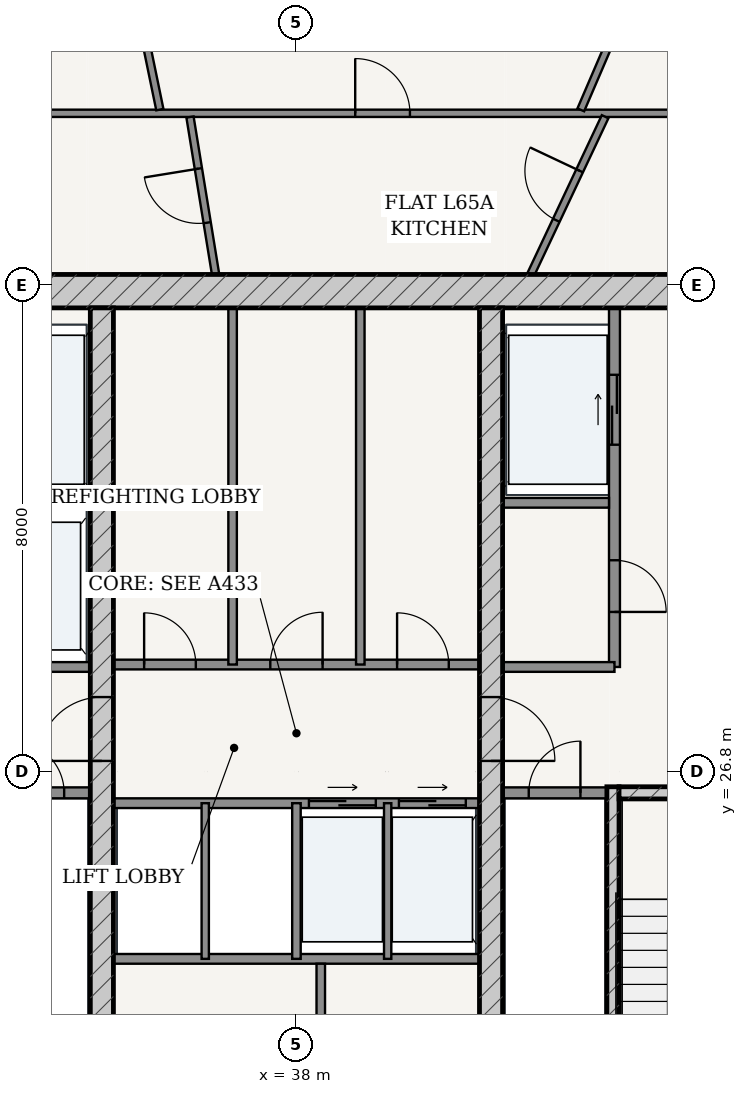
"""IFC4 building model, lengths in metres.
Left out: names, types, materials, properties, quantities, classifications, styles, units other than length and angle.
Written with IfcOpenShell. Run it as: python <this file> out.ifc"""

import sys

from ifc_helpers import new_model, si_unit, direction, frame, frame_2d, origin, place, context, subcontext, project, spatial, rectangle, extrude, source, transform, mapped, element, fill, save


model = new_model("IFC4")
c1 = context("Model", 3, precision=1e-05, world=origin(), true_north=direction((-0.2419218956, 0.970295726276)))
c2 = subcontext(c1, "Body", "Model", "MODEL_VIEW")
j1 = project(units=[si_unit("LENGTHUNIT", "METRE"), si_unit("PLANEANGLEUNIT", "RADIAN")], contexts=[c1])
p1 = place(None, origin())
s1 = spatial("IfcSite", under=j1, at=p1, CompositionType="ELEMENT")
p2 = place(p1, origin())
s2 = spatial("IfcBuilding", under=s1, at=p2, CompositionType="ELEMENT")
p3 = place(p2, frame((0.0, 0.0, 248.2)))
s3 = spatial("IfcBuildingStorey", under=s2, at=p3, CompositionType="ELEMENT", Elevation=248.2)
p4 = place(p3, frame((28.825, 34.7, 0.0), z_axis=(0.0, 0.0, 1.0), x_axis=(1.0, 0.0, 0.0)))
e1 = element("IfcWall", 1, at=p4, inside=s3, PredefinedType="SHEAR", context=c2, shape_type="SweptSolid", body=[
    extrude(rectangle(XDim=18.35, YDim=0.55, at=frame_2d((9.175, 0.0))), origin(), (0.0, 0.0, 1.0), 3.49),
])
p5 = place(p3, frame((43.205, 19.175, 0.0), z_axis=(0.0, 0.0, 1.0), x_axis=(0.0, 1.0, 0.0)))
e2 = element("IfcWall", 2, at=p5, inside=s3, PredefinedType="SOLIDWALL", context=c2, shape_type="SweptSolid", body=[
    extrude(rectangle(XDim=7.375, YDim=0.2, at=frame_2d((3.688, 0.0))), origin(), (0.0, 0.0, 1.0), 3.49),
])
p6 = place(p3, frame((43.305, 26.45, 0.0), z_axis=(0.0, 0.0, 1.0), x_axis=(1.0, 0.0, 0.0)))
e3 = element("IfcWall", 3, at=p6, inside=s3, PredefinedType="SOLIDWALL", context=c2, shape_type="SweptSolid", body=[
    extrude(rectangle(XDim=3.32, YDim=0.2, at=frame_2d((1.66, 0.0))), origin(), (0.0, 0.0, 1.0), 3.49),
])
p7 = place(p6, frame((1.185, 0.0, 0.0)))
e4 = element("IfcOpeningElement", 4, at=p7, cuts=e3, PredefinedType="OPENING", context=c2, shape_type="SweptSolid", body=[
    extrude(rectangle(XDim=0.95, YDim=2.15, at=frame_2d((0.475, 1.075))), frame((0.0, 0.11, 0.0), z_axis=(0.0, -1.0, 0.0), x_axis=(1.0, 0.0, 0.0)), (0.0, 0.0, 1.0), 0.22),
])
p8 = place(p3, frame((34.8, 19.175, 0.0), z_axis=(0.0, 0.0, 1.0), x_axis=(0.0, 1.0, 0.0)))
e5 = element("IfcWall", 5, at=p8, inside=s3, PredefinedType="SHEAR", context=c2, shape_type="SweptSolid", body=[
    extrude(rectangle(XDim=15.25, YDim=0.38, at=frame_2d((7.625, 0.0))), origin(), (0.0, 0.0, 1.0), 3.49),
])
p9 = place(p8, frame((7.8, 0.0, 0.0)))
e6 = element("IfcOpeningElement", 6, at=p9, cuts=e5, PredefinedType="OPENING", context=c2, shape_type="SweptSolid", body=[
    extrude(rectangle(XDim=1.05, YDim=2.15, at=frame_2d((0.525, 1.075))), frame((0.0, 0.2, 0.0), z_axis=(0.0, -1.0, 0.0), x_axis=(1.0, 0.0, 0.0)), (0.0, 0.0, 1.0), 0.4),
])
p10 = place(p3, frame((41.2, 19.175, 0.0), z_axis=(0.0, 0.0, 1.0), x_axis=(0.0, 1.0, 0.0)))
e7 = element("IfcWall", 7, at=p10, inside=s3, PredefinedType="SHEAR", context=c2, shape_type="SweptSolid", body=[
    extrude(rectangle(XDim=15.25, YDim=0.38, at=frame_2d((7.625, 0.0))), origin(), (0.0, 0.0, 1.0), 3.49),
])
p11 = place(p10, frame((7.8, 0.0, 0.0)))
e8 = element("IfcOpeningElement", 8, at=p11, cuts=e7, PredefinedType="OPENING", context=c2, shape_type="SweptSolid", body=[
    extrude(rectangle(XDim=1.05, YDim=2.15, at=frame_2d((0.525, 1.075))), frame((0.0, 0.2, 0.0), z_axis=(0.0, -1.0, 0.0), x_axis=(1.0, 0.0, 0.0)), (0.0, 0.0, 1.0), 0.4),
])
p12 = place(p3, frame((32.9, 26.45, 0.0), z_axis=(0.0, 0.0, 1.0), x_axis=(1.0, 0.0, 0.0)))
e9 = element("IfcWall", 9, at=p12, inside=s3, PredefinedType="PARTITIONING", context=c2, shape_type="SweptSolid", body=[
    extrude(rectangle(XDim=1.71, YDim=0.18, at=frame_2d((0.855, 0.0))), origin(), (0.0, 0.0, 1.0), 3.49),
])
p13 = place(p12, frame((0.43, 0.0, 0.0)))
e10 = element("IfcOpeningElement", 10, at=p13, cuts=e9, PredefinedType="OPENING", context=c2, shape_type="SweptSolid", body=[
    extrude(rectangle(XDim=0.85, YDim=2.1, at=frame_2d((0.425, 1.05))), frame((0.0, 0.1, 0.0), z_axis=(0.0, -1.0, 0.0), x_axis=(1.0, 0.0, 0.0)), (0.0, 0.0, 1.0), 0.2),
])
p14 = place(p3, frame((41.39, 26.45, 0.0), z_axis=(0.0, 0.0, 1.0), x_axis=(1.0, 0.0, 0.0)))
e11 = element("IfcWall", 11, at=p14, inside=s3, PredefinedType="PARTITIONING", context=c2, shape_type="SweptSolid", body=[
    extrude(rectangle(XDim=1.71, YDim=0.18, at=frame_2d((0.855, 0.0))), origin(), (0.0, 0.0, 1.0), 3.49),
])
p15 = place(p14, frame((0.43, 0.0, 0.0)))
e12 = element("IfcOpeningElement", 12, at=p15, cuts=e11, PredefinedType="OPENING", context=c2, shape_type="SweptSolid", body=[
    extrude(rectangle(XDim=0.85, YDim=2.1, at=frame_2d((0.425, 1.05))), frame((0.0, 0.1, 0.0), z_axis=(0.0, -1.0, 0.0), x_axis=(1.0, 0.0, 0.0)), (0.0, 0.0, 1.0), 0.2),
])
p16 = place(p3, frame((32.86, 31.22, 0.0), z_axis=(0.0, 0.0, 1.0), x_axis=(1.0, 0.0, 0.0)))
e13 = element("IfcWall", 13, at=p16, inside=s3, PredefinedType="PARTITIONING", context=c2, shape_type="SweptSolid", body=[
    extrude(rectangle(XDim=1.75, YDim=0.16, at=frame_2d((0.875, 0.0))), origin(), (0.0, 0.0, 1.0), 3.49),
])
p17 = place(p3, frame((32.77, 28.52, 0.0), z_axis=(0.0, 0.0, 1.0), x_axis=(1.0, 0.0, 0.0)))
e14 = element("IfcWall", 14, at=p17, inside=s3, PredefinedType="PARTITIONING", context=c2, shape_type="SweptSolid", body=[
    extrude(rectangle(XDim=1.84, YDim=0.16, at=frame_2d((0.92, 0.0))), origin(), (0.0, 0.0, 1.0), 3.49),
])
p18 = place(p3, frame((43.23, 28.52, 0.0), z_axis=(0.0, 0.0, 1.0), x_axis=(0.0, 1.0, 0.0)))
e15 = element("IfcWall", 15, at=p18, inside=s3, PredefinedType="PARTITIONING", context=c2, shape_type="SweptSolid", body=[
    extrude(rectangle(XDim=5.905, YDim=0.18, at=frame_2d((2.953, 0.0))), origin(), (0.0, 0.0, 1.0), 3.49),
])
p19 = place(p18, frame((0.905, 0.0, 0.0)))
e16 = element("IfcOpeningElement", 16, at=p19, cuts=e15, PredefinedType="OPENING", context=c2, shape_type="SweptSolid", body=[
    extrude(rectangle(XDim=0.85, YDim=2.1, at=frame_2d((0.425, 1.05))), frame((0.0, 0.1, 0.0), z_axis=(0.0, -1.0, 0.0), x_axis=(1.0, 0.0, 0.0)), (0.0, 0.0, 1.0), 0.2),
])
p20 = place(p18, frame((3.655, 0.0, 0.0)))
e17 = element("IfcOpeningElement", 17, at=p20, cuts=e15, PredefinedType="OPENING", context=c2, shape_type="SweptSolid", body=[
    extrude(rectangle(XDim=1.15, YDim=2.2, at=frame_2d((0.575, 1.1))), frame((0.0, 0.1, 0.0), z_axis=(0.0, -1.0, 0.0), x_axis=(1.0, 0.0, 0.0)), (0.0, 0.0, 1.0), 0.2),
])
p21 = place(p3, frame((41.39, 31.22, 0.0), z_axis=(0.0, 0.0, 1.0), x_axis=(1.0, 0.0, 0.0)))
e18 = element("IfcWall", 18, at=p21, inside=s3, PredefinedType="PARTITIONING", context=c2, shape_type="SweptSolid", body=[
    extrude(rectangle(XDim=1.75, YDim=0.16, at=frame_2d((0.875, 0.0))), origin(), (0.0, 0.0, 1.0), 3.49),
])
p22 = place(p3, frame((41.39, 28.52, 0.0), z_axis=(0.0, 0.0, 1.0), x_axis=(1.0, 0.0, 0.0)))
e19 = element("IfcWall", 19, at=p22, inside=s3, PredefinedType="PARTITIONING", context=c2, shape_type="SweptSolid", body=[
    extrude(rectangle(XDim=1.84, YDim=0.16, at=frame_2d((0.92, 0.0))), origin(), (0.0, 0.0, 1.0), 3.49),
])
p23 = place(p3, frame((34.99, 28.56, 0.0), z_axis=(0.0, 0.0, 1.0), x_axis=(1.0, 0.0, 0.0)))
e20 = element("IfcWall", 20, at=p23, inside=s3, PredefinedType="PARTITIONING", context=c2, shape_type="SweptSolid", body=[
    extrude(rectangle(XDim=6.02, YDim=0.16, at=frame_2d((3.01, 0.0))), origin(), (0.0, 0.0, 1.0), 3.49),
])
p24 = place(p23, frame((0.505, 0.0, 0.0)))
e21 = element("IfcOpeningElement", 21, at=p24, cuts=e20, PredefinedType="OPENING", context=c2, shape_type="SweptSolid", body=[
    extrude(rectangle(XDim=0.85, YDim=2.1, at=frame_2d((0.425, 1.05))), frame((0.0, 0.09, 0.0), z_axis=(0.0, -1.0, 0.0), x_axis=(1.0, 0.0, 0.0)), (0.0, 0.0, 1.0), 0.18),
])
p25 = place(p23, frame((2.58, 0.0, 0.0)))
e22 = element("IfcOpeningElement", 22, at=p25, cuts=e20, PredefinedType="OPENING", context=c2, shape_type="SweptSolid", body=[
    extrude(rectangle(XDim=0.86, YDim=2.1, at=frame_2d((0.43, 1.05))), frame((0.0, 0.09, 0.0), z_axis=(0.0, -1.0, 0.0), x_axis=(1.0, 0.0, 0.0)), (0.0, 0.0, 1.0), 0.18),
])
p26 = place(p23, frame((4.665, 0.0, 0.0)))
e23 = element("IfcOpeningElement", 23, at=p26, cuts=e20, PredefinedType="OPENING", context=c2, shape_type="SweptSolid", body=[
    extrude(rectangle(XDim=0.85, YDim=2.1, at=frame_2d((0.425, 1.05))), frame((0.0, 0.09, 0.0), z_axis=(0.0, -1.0, 0.0), x_axis=(1.0, 0.0, 0.0)), (0.0, 0.0, 1.0), 0.18),
])
for number, where, z_axis, x_axis in (
    (24, (36.95, 28.56, 0.0), (0.0, 0.0, 1.0), (0.0, 1.0, 0.0)),
    (25, (39.05, 28.56, 0.0), (0.0, 0.0, 1.0), (0.0, 1.0, 0.0)),
):
    element("IfcWall", number, at=place(p3, frame(where, z_axis=z_axis, x_axis=x_axis)), inside=s3, PredefinedType="PARTITIONING", context=c2, shape_type="SweptSolid", body=[
        extrude(rectangle(XDim=5.865, YDim=0.14, at=frame_2d((2.933, 0.0))), origin(), (0.0, 0.0, 1.0), 3.49),
    ])
p27 = place(p3, frame((34.99, 26.28, 0.0), z_axis=(0.0, 0.0, 1.0), x_axis=(1.0, 0.0, 0.0)))
e26 = element("IfcWall", 26, at=p27, inside=s3, PredefinedType="PARTITIONING", context=c2, shape_type="SweptSolid", body=[
    extrude(rectangle(XDim=6.02, YDim=0.16, at=frame_2d((3.01, 0.0))), origin(), (0.0, 0.0, 1.0), 3.49),
])
p28 = place(p27, frame((3.215, 0.0, 0.0)))
e27 = element("IfcOpeningElement", 27, at=p28, cuts=e26, PredefinedType="OPENING", context=c2, shape_type="SweptSolid", body=[
    extrude(rectangle(XDim=1.1, YDim=2.2, at=frame_2d((0.55, 1.1))), frame((0.0, 0.09, 0.0), z_axis=(0.0, -1.0, 0.0), x_axis=(1.0, 0.0, 0.0)), (0.0, 0.0, 1.0), 0.18),
])
p29 = place(p27, frame((4.695, 0.0, 0.0)))
e28 = element("IfcOpeningElement", 28, at=p29, cuts=e26, PredefinedType="OPENING", context=c2, shape_type="SweptSolid", body=[
    extrude(rectangle(XDim=1.1, YDim=2.2, at=frame_2d((0.55, 1.1))), frame((0.0, 0.09, 0.0), z_axis=(0.0, -1.0, 0.0), x_axis=(1.0, 0.0, 0.0)), (0.0, 0.0, 1.0), 0.18),
])
p30 = place(p3, frame((34.99, 23.72, 0.0), z_axis=(0.0, 0.0, 1.0), x_axis=(1.0, 0.0, 0.0)))
e29 = element("IfcWall", 29, at=p30, inside=s3, PredefinedType="PARTITIONING", context=c2, shape_type="SweptSolid", body=[
    extrude(rectangle(XDim=6.02, YDim=0.16, at=frame_2d((3.01, 0.0))), origin(), (0.0, 0.0, 1.0), 3.49),
])
p31 = place(p3, frame((36.5, 23.72, 0.0), z_axis=(0.0, 0.0, 1.0), x_axis=(0.0, 1.0, 0.0)))
e30 = element("IfcWall", 30, at=p31, inside=s3, PredefinedType="PARTITIONING", context=c2, shape_type="SweptSolid", body=[
    extrude(rectangle(XDim=2.56, YDim=0.12, at=frame_2d((1.28, 0.0))), origin(), (0.0, 0.0, 1.0), 3.49),
])
p32 = place(p3, frame((38.0, 23.72, 0.0), z_axis=(0.0, 0.0, 1.0), x_axis=(0.0, 1.0, 0.0)))
e31 = element("IfcWall", 31, at=p32, inside=s3, PredefinedType="PARTITIONING", context=c2, shape_type="SweptSolid", body=[
    extrude(rectangle(XDim=2.56, YDim=0.14, at=frame_2d((1.28, 0.0))), origin(), (0.0, 0.0, 1.0), 3.49),
])
p33 = place(p3, frame((39.5, 23.72, 0.0), z_axis=(0.0, 0.0, 1.0), x_axis=(0.0, 1.0, 0.0)))
e32 = element("IfcWall", 32, at=p33, inside=s3, PredefinedType="PARTITIONING", context=c2, shape_type="SweptSolid", body=[
    extrude(rectangle(XDim=2.56, YDim=0.12, at=frame_2d((1.28, 0.0))), origin(), (0.0, 0.0, 1.0), 3.49),
])
p34 = place(p3, frame((38.4, 19.175, 0.0), z_axis=(0.0, 0.0, 1.0), x_axis=(0.0, 1.0, 0.0)))
e33 = element("IfcWall", 33, at=p34, inside=s3, PredefinedType="PARTITIONING", context=c2, shape_type="SweptSolid", body=[
    extrude(rectangle(XDim=4.465, YDim=0.14, at=frame_2d((2.232, 0.0))), origin(), (0.0, 0.0, 1.0), 3.49),
])
p35 = place(p3, frame((26.175, 37.625, 0.0), z_axis=(0.0, 0.0, 1.0), x_axis=(1.0, 0.0, 0.0)))
e34 = element("IfcWall", 34, at=p35, inside=s3, PredefinedType="PARTITIONING", context=c2, shape_type="SweptSolid", body=[
    extrude(rectangle(XDim=23.65, YDim=0.12, at=frame_2d((11.825, 0.0))), origin(), (0.0, 0.0, 1.0), 3.015),
])
p36 = place(p35, frame((12.791, 0.0, 0.0)))
e35 = element("IfcOpeningElement", 35, at=p36, cuts=e34, PredefinedType="OPENING", context=c2, shape_type="SweptSolid", body=[
    extrude(rectangle(XDim=0.9, YDim=2.15, at=frame_2d((0.45, 1.075))), frame((0.0, 0.07, 0.0), z_axis=(0.0, -1.0, 0.0), x_axis=(1.0, 0.0, 0.0)), (0.0, 0.0, 1.0), 0.14),
])
p37 = place(p35, frame((6.48, 0.0, 0.0)))
e36 = element("IfcOpeningElement", 36, at=p37, cuts=e34, PredefinedType="OPENING", context=c2, shape_type="SweptSolid", body=[
    extrude(rectangle(XDim=0.9, YDim=2.15, at=frame_2d((0.45, 1.075))), frame((0.0, 0.07, 0.0), z_axis=(0.0, -1.0, 0.0), x_axis=(1.0, 0.0, 0.0)), (0.0, 0.0, 1.0), 0.14),
])
p38 = place(p35, frame((1.831, 0.0, 0.0)))
e37 = element("IfcOpeningElement", 37, at=p38, cuts=e34, PredefinedType="OPENING", context=c2, shape_type="SweptSolid", body=[
    extrude(rectangle(XDim=0.9, YDim=2.15, at=frame_2d((0.45, 1.075))), frame((0.0, 0.07, 0.0), z_axis=(0.0, -1.0, 0.0), x_axis=(1.0, 0.0, 0.0)), (0.0, 0.0, 1.0), 0.14),
])
p39 = place(p3, frame((42.676, 37.682, 0.0), z_axis=(0.0, 0.0, 1.0), x_axis=(0.394777489933, 0.918776759307, 0.0)))
e38 = element("IfcWall", 38, at=p39, inside=s3, PredefinedType="PARTITIONING", context=c2, shape_type="SweptSolid", body=[
    extrude(rectangle(XDim=6.9, YDim=0.12, at=frame_2d((3.45, 0.0))), origin(), (0.0, 0.0, 1.0), 3.121),
])
p40 = place(p39, frame((3.0, 0.0, 0.0)))
e39 = element("IfcOpeningElement", 39, at=p40, cuts=e38, PredefinedType="OPENING", context=c2, shape_type="SweptSolid", body=[
    extrude(rectangle(XDim=0.9, YDim=2.15, at=frame_2d((0.45, 1.075))), frame((0.0, 0.07, 0.0), z_axis=(0.0, -1.0, 0.0), x_axis=(1.0, 0.0, 0.0)), (0.0, 0.0, 1.0), 0.14),
])
p41 = place(p3, frame((35.754, 37.686, 0.0), z_axis=(0.0, 0.0, 1.0), x_axis=(-0.202105877204, 0.979363678313, 0.0)))
e40 = element("IfcWall", 40, at=p41, inside=s3, PredefinedType="PARTITIONING", context=c2, shape_type="SweptSolid", body=[
    extrude(rectangle(XDim=7.512, YDim=0.12, at=frame_2d((3.756, 0.0))), origin(), (0.0, 0.0, 1.0), 3.015),
])
p42 = place(p3, frame((41.854, 34.977, 0.0), z_axis=(0.0, 0.0, 1.0), x_axis=(0.42640827804, 0.904530806783, 0.0)))
e41 = element("IfcWall", 41, at=p42, inside=s3, PredefinedType="PARTITIONING", context=c2, shape_type="SweptSolid", body=[
    extrude(rectangle(XDim=2.866, YDim=0.12, at=frame_2d((1.433, 0.0))), origin(), (0.0, 0.0, 1.0), 3.49),
])
p43 = place(p42, frame((0.983, 0.0, 0.0)))
e42 = element("IfcOpeningElement", 42, at=p43, cuts=e41, PredefinedType="OPENING", context=c2, shape_type="SweptSolid", body=[
    extrude(rectangle(XDim=0.9, YDim=2.15, at=frame_2d((0.45, 1.075))), frame((0.0, 0.07, 0.0), z_axis=(0.0, -1.0, 0.0), x_axis=(1.0, 0.0, 0.0)), (0.0, 0.0, 1.0), 0.14),
])
p44 = place(p3, frame((36.67, 34.977, 0.0), z_axis=(0.0, 0.0, 1.0), x_axis=(-0.160605953374, 0.98701860557, 0.0)))
e43 = element("IfcWall", 43, at=p44, inside=s3, PredefinedType="PARTITIONING", context=c2, shape_type="SweptSolid", body=[
    extrude(rectangle(XDim=2.621, YDim=0.12, at=frame_2d((1.31, 0.0))), origin(), (0.0, 0.0, 1.0), 2.575),
])
p45 = place(p44, frame((0.86, 0.0, 0.0)))
e44 = element("IfcOpeningElement", 44, at=p45, cuts=e43, PredefinedType="OPENING", context=c2, shape_type="SweptSolid", body=[
    extrude(rectangle(XDim=0.9, YDim=2.15, at=frame_2d((0.45, 1.075))), frame((0.0, 0.07, 0.0), z_axis=(0.0, -1.0, 0.0), x_axis=(1.0, 0.0, 0.0)), (0.0, 0.0, 1.0), 0.14),
])
m1 = source(origin(), c2, "Body", "SweptSolid", [
    extrude(rectangle(XDim=1.05, YDim=2.15, at=frame_2d((0.525, 1.075))), frame((0.0, 0.025, 0.0), z_axis=(0.0, -1.0, 0.0), x_axis=(1.0, 0.0, 0.0)), (0.0, 0.0, 1.0), 0.05),
])
p46 = place(p9, origin())
e45 = element("IfcDoor", 45, at=p46, inside=s3, OperationType="SINGLE_SWING_LEFT", PredefinedType="DOOR", context=c2, shape_type="MappedRepresentation", body=[
    mapped(m1, transform((0.0, 0.0, 0.0), scale=1.0)),
])
fill(e6, e45)
p47 = place(p11, frame((1.05, 0.0, 0.0), z_axis=(0.0, 0.0, 1.0), x_axis=(-1.0, 0.0, 0.0)))
e46 = element("IfcDoor", 46, at=p47, inside=s3, OperationType="SINGLE_SWING_RIGHT", PredefinedType="DOOR", context=c2, shape_type="MappedRepresentation", body=[
    mapped(m1, transform((0.0, 0.0, 0.0), scale=1.0)),
])
fill(e8, e46)
m2 = source(origin(), c2, "Body", "SweptSolid", [
    extrude(rectangle(XDim=0.85, YDim=2.1, at=frame_2d((0.425, 1.05))), frame((0.0, 0.025, 0.0), z_axis=(0.0, -1.0, 0.0), x_axis=(1.0, 0.0, 0.0)), (0.0, 0.0, 1.0), 0.05),
])
p48 = place(p13, origin())
e47 = element("IfcDoor", 47, at=p48, inside=s3, OperationType="SINGLE_SWING_LEFT", PredefinedType="DOOR", context=c2, shape_type="MappedRepresentation", body=[
    mapped(m2, transform((0.0, 0.0, 0.0), scale=1.0)),
])
fill(e10, e47)
p49 = place(p15, origin())
e48 = element("IfcDoor", 48, at=p49, inside=s3, OperationType="SINGLE_SWING_RIGHT", PredefinedType="DOOR", context=c2, shape_type="MappedRepresentation", body=[
    mapped(m2, transform((0.0, 0.0, 0.0), scale=1.0)),
])
fill(e12, e48)
p50 = place(p19, frame((0.85, 0.0, 0.0), z_axis=(0.0, 0.0, 1.0), x_axis=(-1.0, 0.0, 0.0)))
e49 = element("IfcDoor", 49, at=p50, inside=s3, OperationType="SINGLE_SWING_RIGHT", PredefinedType="DOOR", context=c2, shape_type="MappedRepresentation", body=[
    mapped(m2, transform((0.0, 0.0, 0.0), scale=1.0)),
])
fill(e16, e49)
p51 = place(p24, origin())
e50 = element("IfcDoor", 50, at=p51, inside=s3, OperationType="SINGLE_SWING_LEFT", PredefinedType="DOOR", context=c2, shape_type="MappedRepresentation", body=[
    mapped(m2, transform((0.0, 0.0, 0.0), scale=1.0)),
])
fill(e21, e50)
m3 = source(origin(), c2, "Body", "SweptSolid", [
    extrude(rectangle(XDim=0.86, YDim=2.1, at=frame_2d((0.43, 1.05))), frame((0.0, 0.025, 0.0), z_axis=(0.0, -1.0, 0.0), x_axis=(1.0, 0.0, 0.0)), (0.0, 0.0, 1.0), 0.05),
])
p52 = place(p25, origin())
e51 = element("IfcDoor", 51, at=p52, inside=s3, OperationType="SINGLE_SWING_RIGHT", PredefinedType="DOOR", context=c2, shape_type="MappedRepresentation", body=[
    mapped(m3, transform((0.0, 0.0, 0.0), scale=1.0)),
])
fill(e22, e51)
p53 = place(p26, origin())
e52 = element("IfcDoor", 52, at=p53, inside=s3, OperationType="SINGLE_SWING_LEFT", PredefinedType="DOOR", context=c2, shape_type="MappedRepresentation", body=[
    mapped(m2, transform((0.0, 0.0, 0.0), scale=1.0)),
])
fill(e23, e52)
m4 = source(origin(), c2, "Body", "SweptSolid", [
    extrude(rectangle(XDim=1.15, YDim=2.2, at=frame_2d((0.575, 1.1))), frame((0.0, 0.025, 0.0), z_axis=(0.0, -1.0, 0.0), x_axis=(1.0, 0.0, 0.0)), (0.0, 0.0, 1.0), 0.05),
])
p54 = place(p20, origin())
e53 = element("IfcDoor", 53, at=p54, inside=s3, OperationType="DOUBLE_DOOR_SLIDING", PredefinedType="DOOR", context=c2, shape_type="MappedRepresentation", body=[
    mapped(m4, transform((0.0, 0.0, 0.0), scale=1.0)),
])
fill(e17, e53)
m5 = source(origin(), c2, "Body", "SweptSolid", [
    extrude(rectangle(XDim=1.1, YDim=2.2, at=frame_2d((0.55, 1.1))), frame((0.0, 0.025, 0.0), z_axis=(0.0, -1.0, 0.0), x_axis=(1.0, 0.0, 0.0)), (0.0, 0.0, 1.0), 0.05),
])
p55 = place(p28, origin())
e54 = element("IfcDoor", 54, at=p55, inside=s3, OperationType="DOUBLE_DOOR_SLIDING", PredefinedType="DOOR", context=c2, shape_type="MappedRepresentation", body=[
    mapped(m5, transform((0.0, 0.0, 0.0), scale=1.0)),
])
fill(e27, e54)
p56 = place(p29, origin())
e55 = element("IfcDoor", 55, at=p56, inside=s3, OperationType="DOUBLE_DOOR_SLIDING", PredefinedType="DOOR", context=c2, shape_type="MappedRepresentation", body=[
    mapped(m5, transform((0.0, 0.0, 0.0), scale=1.0)),
])
fill(e28, e55)
m6 = source(origin(), c2, "Body", "SweptSolid", [
    extrude(rectangle(XDim=0.9, YDim=2.15, at=frame_2d((0.45, 1.075))), frame((0.0, 0.025, 0.0), z_axis=(0.0, -1.0, 0.0), x_axis=(1.0, 0.0, 0.0)), (0.0, 0.0, 1.0), 0.05),
])
p57 = place(p43, origin())
e56 = element("IfcDoor", 56, at=p57, inside=s3, OperationType="SINGLE_SWING_RIGHT", PredefinedType="DOOR", context=c2, shape_type="MappedRepresentation", body=[
    mapped(m6, transform((0.0, 0.0, 0.0), scale=1.0)),
])
fill(e42, e56)
p58 = place(p36, origin())
e57 = element("IfcDoor", 57, at=p58, inside=s3, OperationType="SINGLE_SWING_LEFT", PredefinedType="DOOR", context=c2, shape_type="MappedRepresentation", body=[
    mapped(m6, transform((0.0, 0.0, 0.0), scale=1.0)),
])
fill(e35, e57)
p59 = place(p45, origin())
e58 = element("IfcDoor", 58, at=p59, inside=s3, OperationType="SINGLE_SWING_RIGHT", PredefinedType="DOOR", context=c2, shape_type="MappedRepresentation", body=[
    mapped(m6, transform((0.0, 0.0, 0.0), scale=1.0)),
])
fill(e44, e58)
save(model, sys.argv[1])
